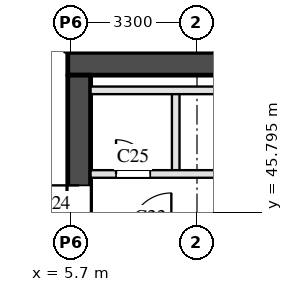
"""IFC4 building model, lengths in metres.
Left out: names, types, materials, properties, quantities, classifications, styles, units other than length and angle.
Written with IfcOpenShell. Run it as: python <this file> out.ifc"""

import sys

from ifc_helpers import new_model, si_unit, direction, frame, frame_2d, origin, place, context, subcontext, project, spatial, rectangle, extrude, element, fill, save


model = new_model("IFC4")
c1 = context("Model", 3, precision=1e-05, world=origin(), true_north=direction((0.0, 1.0)))
c2 = subcontext(c1, "Body", "Model", "MODEL_VIEW")
j1 = project(units=[si_unit("LENGTHUNIT", "METRE"), si_unit("PLANEANGLEUNIT", "RADIAN")], contexts=[c1])
p1 = place(None, origin())
s1 = spatial("IfcSite", under=j1, at=p1, CompositionType="ELEMENT")
p2 = place(p1, origin())
s2 = spatial("IfcBuilding", under=s1, at=p2, CompositionType="ELEMENT")
p3 = place(p2, frame((0.0, 0.0, 14.0)))
s3 = spatial("IfcBuildingStorey", under=s2, at=p3, CompositionType="ELEMENT", Elevation=14.0)
p4 = place(p3, frame((5.6, 49.7, 0.0), z_axis=(0.0, 0.0, 1.0), x_axis=(1.0, 0.0, 0.0)))
e1 = element("IfcWall", 1, at=p4, inside=s3, PredefinedType="SHEAR", context=c2, shape_type="SweptSolid", body=[
    extrude(rectangle(XDim=12.4, YDim=0.6, at=frame_2d((6.2, 0.0))), origin(), (0.0, 0.0, 1.0), 6.59),
])
p5 = place(p3, frame((5.9, 29.1, 0.0), z_axis=(0.0, 0.0, 1.0), x_axis=(0.0, 1.0, 0.0)))
e2 = element("IfcWall", 2, at=p5, inside=s3, PredefinedType="SHEAR", context=c2, shape_type="SweptSolid", body=[
    extrude(rectangle(XDim=20.3, YDim=0.6, at=frame_2d((10.15, 0.0))), origin(), (0.0, 0.0, 1.0), 6.59),
])
p6 = place(p5, frame((3.6, 0.0, 0.0)))
e3 = element("IfcOpeningElement", 3, at=p6, cuts=e2, PredefinedType="OPENING", context=c2, shape_type="SweptSolid", body=[
    extrude(rectangle(XDim=1.8, YDim=2.1, at=frame_2d((0.9, 1.05))), frame((0.0, 0.31, 0.0), z_axis=(0.0, -1.0, 0.0), x_axis=(1.0, 0.0, 0.0)), (0.0, 0.0, 1.0), 0.62),
])
p7 = place(p5, frame((16.4, 0.0, 0.0)))
e4 = element("IfcOpeningElement", 4, at=p7, cuts=e2, PredefinedType="OPENING", context=c2, shape_type="SweptSolid", body=[
    extrude(rectangle(XDim=1.0, YDim=2.1, at=frame_2d((0.5, 1.05))), frame((0.0, 0.31, 0.0), z_axis=(0.0, -1.0, 0.0), x_axis=(1.0, 0.0, 0.0)), (0.0, 0.0, 1.0), 0.62),
])
p8 = place(p3, frame((8.44, 46.8, 0.0), z_axis=(0.0, 0.0, 1.0), x_axis=(0.0, 1.0, 0.0)))
e5 = element("IfcWall", 5, at=p8, inside=s3, PredefinedType="PARTITIONING", context=c2, shape_type="SweptSolid", body=[
    extrude(rectangle(XDim=2.2, YDim=0.2, at=frame_2d((1.1, 0.0))), origin(), (0.0, 0.0, 1.0), 6.59),
])
p9 = place(p3, frame((6.2, 46.8, 0.0), z_axis=(0.0, 0.0, 1.0), x_axis=(1.0, 0.0, 0.0)))
e6 = element("IfcWall", 6, at=p9, inside=s3, PredefinedType="PARTITIONING", context=c2, shape_type="SweptSolid", body=[
    extrude(rectangle(XDim=11.2, YDim=0.2, at=frame_2d((5.6, 0.0))), origin(), (0.0, 0.0, 1.0), 6.59),
])
p10 = place(p9, frame((0.67, 0.0, 0.0)))
e7 = element("IfcOpeningElement", 7, at=p10, cuts=e6, PredefinedType="OPENING", context=c2, shape_type="SweptSolid", body=[
    extrude(rectangle(XDim=0.9, YDim=2.1, at=frame_2d((0.45, 1.05))), frame((0.0, 0.11, 0.0), z_axis=(0.0, -1.0, 0.0), x_axis=(1.0, 0.0, 0.0)), (0.0, 0.0, 1.0), 0.22),
])
p11 = place(p9, frame((6.27, 0.0, 0.0)))
e8 = element("IfcOpeningElement", 8, at=p11, cuts=e6, PredefinedType="OPENING", context=c2, shape_type="SweptSolid", body=[
    extrude(rectangle(XDim=0.9, YDim=2.1, at=frame_2d((0.45, 1.05))), frame((0.0, 0.11, 0.0), z_axis=(0.0, -1.0, 0.0), x_axis=(1.0, 0.0, 0.0)), (0.0, 0.0, 1.0), 0.22),
])
p12 = place(p3, frame((6.2, 49.0, 0.0), z_axis=(0.0, 0.0, 1.0), x_axis=(1.0, 0.0, 0.0)))
e9 = element("IfcWall", 9, at=p12, inside=s3, PredefinedType="PARTITIONING", context=c2, shape_type="SweptSolid", body=[
    extrude(rectangle(XDim=11.2, YDim=0.2, at=frame_2d((5.6, 0.0))), origin(), (0.0, 0.0, 1.0), 6.59),
])
p13 = place(p7, origin())
e10 = element("IfcDoor", 10, at=p13, inside=s3, OperationType="SINGLE_SWING_RIGHT", PredefinedType="DOOR", context=c2, shape_type="SweptSolid", body=[
    extrude(rectangle(XDim=1.0, YDim=2.1, at=frame_2d((0.5, 1.05))), frame((0.0, 0.025, 0.0), z_axis=(0.0, -1.0, 0.0), x_axis=(1.0, 0.0, 0.0)), (0.0, 0.0, 1.0), 0.05),
])
fill(e4, e10)
p14 = place(p10, origin())
e11 = element("IfcDoor", 11, at=p14, inside=s3, OperationType="SINGLE_SWING_LEFT", PredefinedType="DOOR", context=c2, shape_type="SweptSolid", body=[
    extrude(rectangle(XDim=0.9, YDim=2.1, at=frame_2d((0.45, 1.05))), frame((0.0, 0.025, 0.0), z_axis=(0.0, -1.0, 0.0), x_axis=(1.0, 0.0, 0.0)), (0.0, 0.0, 1.0), 0.05),
])
fill(e7, e11)
save(model, sys.argv[1])
